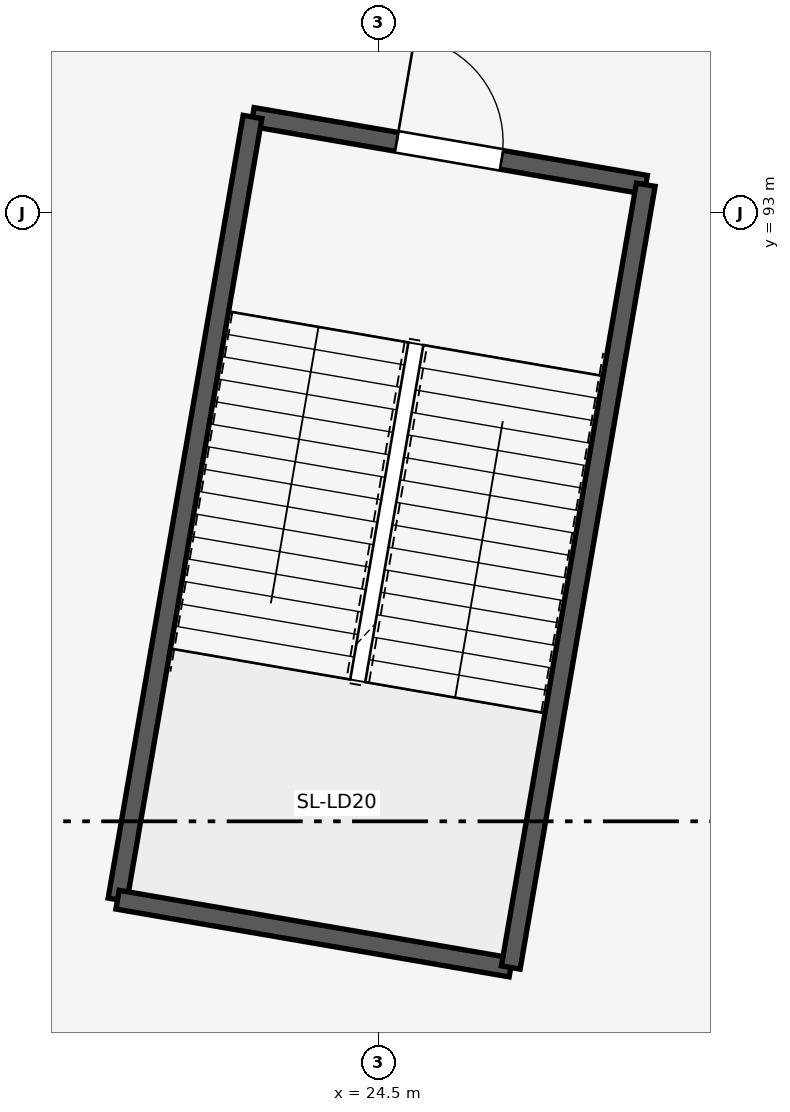
"""IFC4 building model, lengths in metres.
Left out: names, types, materials, properties, quantities, classifications, styles, units other than length and angle.
Written with IfcOpenShell. Run it as: python <this file> out.ifc"""

import sys

from ifc_helpers import new_model, si_unit, direction, frame, frame_2d, origin, place, context, subcontext, project, spatial, rectangle, extrude, element, fill, save


model = new_model("IFC4")
c1 = context("Model", 3, precision=1e-05, world=origin(), true_north=direction((0.0, 1.0)))
c2 = subcontext(c1, "Body", "Model", "MODEL_VIEW")
j1 = project(units=[si_unit("LENGTHUNIT", "METRE"), si_unit("PLANEANGLEUNIT", "RADIAN")], contexts=[c1])
p1 = place(None, origin())
s1 = spatial("IfcSite", under=j1, at=p1, CompositionType="ELEMENT")
p2 = place(p1, origin())
s2 = spatial("IfcBuilding", under=s1, at=p2, CompositionType="ELEMENT")
p3 = place(p2, frame((0.0, 0.0, 5.4)))
s3 = spatial("IfcBuildingStorey", under=s2, at=p3, CompositionType="ELEMENT", Elevation=5.4)
p4 = place(p3, frame((28.013, 93.375, 0.0), z_axis=(0.0, 0.0, 1.0), x_axis=(-0.985457162135, 0.16992404655, 0.0)))
e1 = element("IfcWall", 1, at=p4, inside=s3, PredefinedType="SHEAR", context=c2, shape_type="SweptSolid", body=[
    extrude(rectangle(XDim=5.25, YDim=0.25, at=frame_2d((2.625, 0.0))), origin(), (0.0, 0.0, 1.0), 4.92),
])
p5 = place(p4, frame((1.925, 0.0, 0.0)))
e2 = element("IfcOpeningElement", 2, at=p5, cuts=e1, PredefinedType="OPENING", context=c2, shape_type="SweptSolid", body=[
    extrude(rectangle(XDim=1.4, YDim=2.2, at=frame_2d((0.7, 1.1))), frame((0.0, 0.135, 0.0), z_axis=(0.0, -1.0, 0.0), x_axis=(1.0, 0.0, 0.0)), (0.0, 0.0, 1.0), 0.27),
])
p6 = place(p3, frame((22.84, 94.267, 0.0), z_axis=(0.0, 0.0, 1.0), x_axis=(-0.169938992676, -0.985454584833, 0.0)))
e3 = element("IfcWall", 3, at=p6, inside=s3, PredefinedType="SHEAR", context=c2, shape_type="SweptSolid", body=[
    extrude(rectangle(XDim=10.45, YDim=0.25, at=frame_2d((5.225, 0.0))), origin(), (0.0, 0.0, 1.0), 4.92),
])
p7 = place(p3, frame((21.064, 83.969, 0.0), z_axis=(0.0, 0.0, 1.0), x_axis=(0.985458504796, -0.169916259745, 0.0)))
e4 = element("IfcWall", 4, at=p7, inside=s3, PredefinedType="SHEAR", context=c2, shape_type="SweptSolid", body=[
    extrude(rectangle(XDim=5.25, YDim=0.25, at=frame_2d((2.625, 0.0))), origin(), (0.0, 0.0, 1.0), 4.92),
])
p8 = place(p3, frame((26.238, 83.077, 0.0), z_axis=(0.0, 0.0, 1.0), x_axis=(0.16991630471, 0.985458497043, 0.0)))
e5 = element("IfcWall", 5, at=p8, inside=s3, PredefinedType="SHEAR", context=c2, shape_type="SweptSolid", body=[
    extrude(rectangle(XDim=10.45, YDim=0.25, at=frame_2d((5.225, 0.0))), origin(), (0.0, 0.0, 1.0), 4.92),
])
p9 = place(p5, frame((1.4, 0.0, 0.0), z_axis=(0.0, 0.0, 1.0), x_axis=(-1.0, 0.0, 0.0)))
e6 = element("IfcDoor", 6, at=p9, inside=s3, OperationType="SINGLE_SWING_LEFT", PredefinedType="DOOR", context=c2, shape_type="SweptSolid", body=[
    extrude(rectangle(XDim=1.4, YDim=2.2, at=frame_2d((0.7, 1.1))), frame((0.0, 0.025, 0.0), z_axis=(0.0, -1.0, 0.0), x_axis=(1.0, 0.0, 0.0)), (0.0, 0.0, 1.0), 0.05),
])
fill(e2, e6)
save(model, sys.argv[1])
